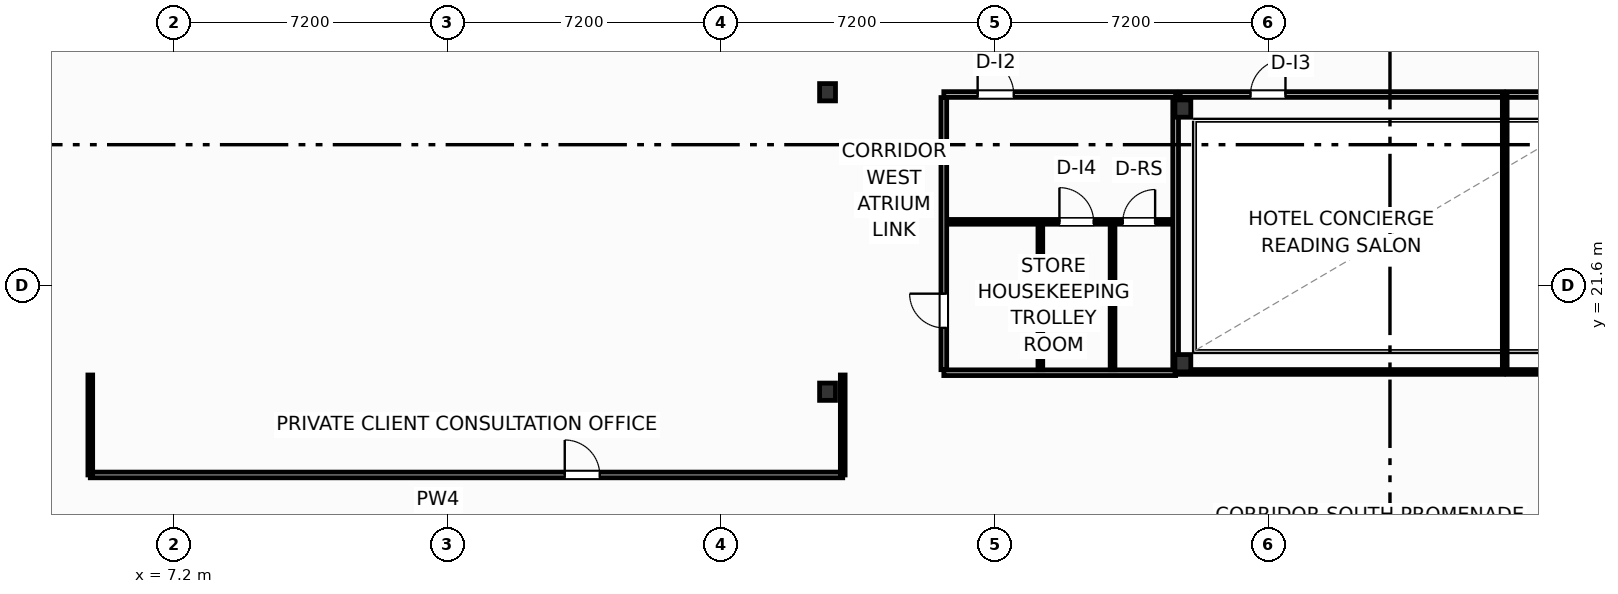
"""IFC4 building model, lengths in metres.
Left out: names, types, materials, properties, quantities, classifications, styles, units other than length and angle.
Written with IfcOpenShell. Run it as: python <this file> out.ifc"""

import sys

from ifc_helpers import new_model, si_unit, direction, frame, frame_2d, origin, origin_2d, place, context, subcontext, project, spatial, rectangle, i_section, extrude, element, fill, save


model = new_model("IFC4")
c1 = context("Model", 3, precision=1e-05, world=origin(), true_north=direction((0.0, 1.0)))
c2 = subcontext(c1, "Body", "Model", "MODEL_VIEW")
j1 = project(units=[si_unit("LENGTHUNIT", "METRE"), si_unit("PLANEANGLEUNIT", "RADIAN")], contexts=[c1])
p1 = place(None, origin())
s1 = spatial("IfcSite", under=j1, at=p1, CompositionType="ELEMENT")
p2 = place(p1, origin())
s2 = spatial("IfcBuilding", under=s1, at=p2, CompositionType="ELEMENT")
p3 = place(p2, frame((0.0, 0.0, 158.7)))
s3 = spatial("IfcBuildingStorey", under=s2, at=p3, CompositionType="ELEMENT", Elevation=158.7)
for number, where, z_axis, x_axis in (
    (1, (33.75, 19.55, 0.0), (0.0, 0.0, 1.0), (1.0, 0.0, 0.0)),
    (2, (33.75, 26.25, 0.0), (0.0, 0.0, 1.0), (1.0, 0.0, 0.0)),
    (3, (24.4, 18.8, 0.0), (0.0, 0.0, 1.0), (1.0, 0.0, 0.0)),
    (4, (24.4, 26.68, 0.0), (0.0, 0.0, 1.0), (1.0, 0.0, 0.0)),
):
    element("IfcColumn", number, at=place(p3, frame(where, z_axis=z_axis, x_axis=x_axis)), inside=s3, PredefinedType="COLUMN", context=c2, shape_type="SweptSolid", body=[
        extrude(i_section(OverallWidth=0.418, OverallDepth=0.455, WebThickness=0.042, FlangeThickness=0.068, FilletRadius=0.025, at=origin_2d()), origin(), (0.0, 0.0, 1.0), 3.7),
    ])
p4 = place(p3, frame((33.68, 26.62, 0.0), z_axis=(0.0, 0.0, 1.0), x_axis=(1.0, 0.0, 0.0)))
e5 = element("IfcWall", 5, at=p4, inside=s3, PredefinedType="PARTITIONING", context=c2, shape_type="SweptSolid", body=[
    extrude(rectangle(XDim=8.5, YDim=0.15, at=frame_2d((4.25, 0.0))), origin(), (0.0, 0.0, 1.0), 3.38),
])
p5 = place(p4, frame((1.85, 0.0, 0.0)))
e6 = element("IfcOpeningElement", 6, at=p5, cuts=e5, PredefinedType="OPENING", context=c2, shape_type="SweptSolid", body=[
    extrude(rectangle(XDim=0.92, YDim=2.05, at=frame_2d((0.46, 1.025))), frame((0.0, 0.085, 0.0), z_axis=(0.0, -1.0, 0.0), x_axis=(1.0, 0.0, 0.0)), (0.0, 0.0, 1.0), 0.17),
])
p6 = place(p3, frame((33.68, 19.32, 0.0), z_axis=(0.0, 0.0, 1.0), x_axis=(1.0, 0.0, 0.0)))
e7 = element("IfcWall", 7, at=p6, inside=s3, PredefinedType="PARTITIONING", context=c2, shape_type="SweptSolid", body=[
    extrude(rectangle(XDim=8.5, YDim=0.125, at=frame_2d((4.25, 0.0))), origin(), (0.0, 0.0, 1.0), 2.754),
])
p7 = place(p3, frame((42.22, 19.32, 0.0), z_axis=(0.0, 0.0, 1.0), x_axis=(0.0, 1.0, 0.0)))
e8 = element("IfcWall", 8, at=p7, inside=s3, PredefinedType="PARTITIONING", context=c2, shape_type="SweptSolid", body=[
    extrude(rectangle(XDim=7.3, YDim=0.125, at=frame_2d((3.65, 0.0))), origin(), (0.0, 0.0, 1.0), 3.38),
])
p8 = place(p3, frame((42.28, 26.62, 0.0), z_axis=(0.0, 0.0, 1.0), x_axis=(1.0, 0.0, 0.0)))
e9 = element("IfcWall", 9, at=p8, inside=s3, PredefinedType="PARTITIONING", context=c2, shape_type="SweptSolid", body=[
    extrude(rectangle(XDim=8.06, YDim=0.15, at=frame_2d((4.03, 0.0))), origin(), (0.0, 0.0, 1.0), 3.38),
])
p9 = place(p8, frame((0.954, 0.0, 0.0)))
e10 = element("IfcOpeningElement", 10, at=p9, cuts=e9, PredefinedType="OPENING", context=c2, shape_type="SweptSolid", body=[
    extrude(rectangle(XDim=0.92, YDim=2.05, at=frame_2d((0.46, 1.025))), frame((0.0, 0.085, 0.0), z_axis=(0.0, -1.0, 0.0), x_axis=(1.0, 0.0, 0.0)), (0.0, 0.0, 1.0), 0.17),
])
p10 = place(p3, frame((42.28, 19.32, 0.0), z_axis=(0.0, 0.0, 1.0), x_axis=(1.0, 0.0, 0.0)))
e11 = element("IfcWall", 11, at=p10, inside=s3, PredefinedType="PARTITIONING", context=c2, shape_type="SweptSolid", body=[
    extrude(rectangle(XDim=8.06, YDim=0.125, at=frame_2d((4.03, 0.0))), origin(), (0.0, 0.0, 1.0), 2.592),
])
p11 = place(p3, frame((5.0, 16.61, 0.0), z_axis=(0.0, 0.0, 1.0), x_axis=(1.0, 0.0, 0.0)))
e12 = element("IfcWall", 12, at=p11, inside=s3, PredefinedType="PARTITIONING", context=c2, shape_type="SweptSolid", body=[
    extrude(rectangle(XDim=19.8, YDim=0.15, at=frame_2d((9.9, 0.0))), origin(), (0.0, 0.0, 1.0), 3.38),
])
p12 = place(p11, frame((12.485, 0.0, 0.0)))
e13 = element("IfcOpeningElement", 13, at=p12, cuts=e12, PredefinedType="OPENING", context=c2, shape_type="SweptSolid", body=[
    extrude(rectangle(XDim=0.92, YDim=2.05, at=frame_2d((0.46, 1.025))), frame((0.0, 0.085, 0.0), z_axis=(0.0, -1.0, 0.0), x_axis=(1.0, 0.0, 0.0)), (0.0, 0.0, 1.0), 0.17),
])
p13 = place(p3, frame((5.0, 16.61, 0.0), z_axis=(0.0, 0.0, 1.0), x_axis=(0.0, 1.0, 0.0)))
e14 = element("IfcWall", 14, at=p13, inside=s3, PredefinedType="PARTITIONING", context=c2, shape_type="SweptSolid", body=[
    extrude(rectangle(XDim=2.63, YDim=0.125, at=frame_2d((1.315, 0.0))), origin(), (0.0, 0.0, 1.0), 3.38),
])
p14 = place(p3, frame((24.8, 16.61, 0.0), z_axis=(0.0, 0.0, 1.0), x_axis=(0.0, 1.0, 0.0)))
e15 = element("IfcWall", 15, at=p14, inside=s3, PredefinedType="PARTITIONING", context=c2, shape_type="SweptSolid", body=[
    extrude(rectangle(XDim=2.63, YDim=0.125, at=frame_2d((1.315, 0.0))), origin(), (0.0, 0.0, 1.0), 1.165),
])
p15 = place(p3, frame((27.46, 26.62, 0.0), z_axis=(0.0, 0.0, 1.0), x_axis=(1.0, 0.0, 0.0)))
e16 = element("IfcWall", 16, at=p15, inside=s3, PredefinedType="PARTITIONING", context=c2, shape_type="SweptSolid", body=[
    extrude(rectangle(XDim=6.1, YDim=0.15, at=frame_2d((3.05, 0.0))), origin(), (0.0, 0.0, 1.0), 2.592),
])
p16 = place(p15, frame((0.89, 0.0, 0.0)))
e17 = element("IfcOpeningElement", 17, at=p16, cuts=e16, PredefinedType="OPENING", context=c2, shape_type="SweptSolid", body=[
    extrude(rectangle(XDim=0.95, YDim=2.05, at=frame_2d((0.475, 1.025))), frame((0.0, 0.085, 0.0), z_axis=(0.0, -1.0, 0.0), x_axis=(1.0, 0.0, 0.0)), (0.0, 0.0, 1.0), 0.17),
])
p17 = place(p3, frame((27.46, 19.3, 0.0), z_axis=(0.0, 0.0, 1.0), x_axis=(1.0, 0.0, 0.0)))
e18 = element("IfcWall", 18, at=p17, inside=s3, PredefinedType="PARTITIONING", context=c2, shape_type="SweptSolid", body=[
    extrude(rectangle(XDim=6.1, YDim=0.15, at=frame_2d((3.05, 0.0))), origin(), (0.0, 0.0, 1.0), 2.592),
])
p18 = place(p3, frame((27.52, 23.27, 0.0), z_axis=(0.0, 0.0, 1.0), x_axis=(1.0, 0.0, 0.0)))
e19 = element("IfcWall", 19, at=p18, inside=s3, PredefinedType="PARTITIONING", context=c2, shape_type="SweptSolid", body=[
    extrude(rectangle(XDim=6.0, YDim=0.125, at=frame_2d((3.0, 0.0))), origin(), (0.0, 0.0, 1.0), 3.38),
])
p19 = place(p18, frame((2.982, 0.0, 0.0)))
e20 = element("IfcOpeningElement", 20, at=p19, cuts=e19, PredefinedType="OPENING", context=c2, shape_type="SweptSolid", body=[
    extrude(rectangle(XDim=0.9, YDim=2.05, at=frame_2d((0.45, 1.025))), frame((0.0, 0.073, 0.0), z_axis=(0.0, -1.0, 0.0), x_axis=(1.0, 0.0, 0.0)), (0.0, 0.0, 1.0), 0.145),
])
p20 = place(p18, frame((4.65, 0.0, 0.0)))
e21 = element("IfcOpeningElement", 21, at=p20, cuts=e19, PredefinedType="OPENING", context=c2, shape_type="SweptSolid", body=[
    extrude(rectangle(XDim=0.85, YDim=2.05, at=frame_2d((0.425, 1.025))), frame((0.0, 0.073, 0.0), z_axis=(0.0, -1.0, 0.0), x_axis=(1.0, 0.0, 0.0)), (0.0, 0.0, 1.0), 0.145),
])
for number, where, z_axis, x_axis in (
    (22, (30.0, 19.38, 0.0), (0.0, 0.0, 1.0), (0.0, 1.0, 0.0)),
    (23, (31.9, 19.38, 0.0), (0.0, 0.0, 1.0), (0.0, 1.0, 0.0)),
):
    element("IfcWall", number, at=place(p3, frame(where, z_axis=z_axis, x_axis=x_axis)), inside=s3, PredefinedType="PARTITIONING", context=c2, shape_type="SweptSolid", body=[
        extrude(rectangle(XDim=3.82, YDim=0.125, at=frame_2d((1.91, 0.0))), origin(), (0.0, 0.0, 1.0), 3.38),
    ])
p21 = place(p3, frame((27.46, 19.38, 0.0), z_axis=(0.0, 0.0, 1.0), x_axis=(0.0, 1.0, 0.0)))
e24 = element("IfcWall", 24, at=p21, inside=s3, PredefinedType="PARTITIONING", context=c2, shape_type="SweptSolid", body=[
    extrude(rectangle(XDim=7.16, YDim=0.15, at=frame_2d((3.58, 0.0))), origin(), (0.0, 0.0, 1.0), 3.38),
])
p22 = place(p21, frame((1.1, 0.0, 0.0)))
e25 = element("IfcOpeningElement", 25, at=p22, cuts=e24, PredefinedType="OPENING", context=c2, shape_type="SweptSolid", body=[
    extrude(rectangle(XDim=0.9, YDim=2.05, at=frame_2d((0.45, 1.025))), frame((0.0, 0.085, 0.0), z_axis=(0.0, -1.0, 0.0), x_axis=(1.0, 0.0, 0.0)), (0.0, 0.0, 1.0), 0.17),
])
p23 = place(p3, frame((33.56, 19.38, 0.0), z_axis=(0.0, 0.0, 1.0), x_axis=(0.0, 1.0, 0.0)))
e26 = element("IfcWall", 26, at=p23, inside=s3, PredefinedType="PARTITIONING", context=c2, shape_type="SweptSolid", body=[
    extrude(rectangle(XDim=7.16, YDim=0.15, at=frame_2d((3.58, 0.0))), origin(), (0.0, 0.0, 1.0), 2.754),
])
p24 = place(p5, origin())
e27 = element("IfcDoor", 27, at=p24, inside=s3, OperationType="SINGLE_SWING_RIGHT", PredefinedType="DOOR", context=c2, shape_type="SweptSolid", body=[
    extrude(rectangle(XDim=0.92, YDim=2.05, at=frame_2d((0.46, 1.025))), frame((0.0, 0.025, 0.0), z_axis=(0.0, -1.0, 0.0), x_axis=(1.0, 0.0, 0.0)), (0.0, 0.0, 1.0), 0.05),
])
fill(e6, e27)
p25 = place(p12, origin())
e28 = element("IfcDoor", 28, at=p25, inside=s3, OperationType="SINGLE_SWING_LEFT", PredefinedType="DOOR", context=c2, shape_type="SweptSolid", body=[
    extrude(rectangle(XDim=0.92, YDim=2.05, at=frame_2d((0.46, 1.025))), frame((0.0, 0.025, 0.0), z_axis=(0.0, -1.0, 0.0), x_axis=(1.0, 0.0, 0.0)), (0.0, 0.0, 1.0), 0.05),
])
fill(e13, e28)
p26 = place(p16, origin())
e29 = element("IfcDoor", 29, at=p26, inside=s3, OperationType="SINGLE_SWING_LEFT", PredefinedType="DOOR", context=c2, shape_type="SweptSolid", body=[
    extrude(rectangle(XDim=0.95, YDim=2.05, at=frame_2d((0.475, 1.025))), frame((0.0, 0.025, 0.0), z_axis=(0.0, -1.0, 0.0), x_axis=(1.0, 0.0, 0.0)), (0.0, 0.0, 1.0), 0.05),
])
fill(e17, e29)
p27 = place(p19, origin())
e30 = element("IfcDoor", 30, at=p27, inside=s3, OperationType="SINGLE_SWING_LEFT", PredefinedType="DOOR", context=c2, shape_type="SweptSolid", body=[
    extrude(rectangle(XDim=0.9, YDim=2.05, at=frame_2d((0.45, 1.025))), frame((0.0, 0.025, 0.0), z_axis=(0.0, -1.0, 0.0), x_axis=(1.0, 0.0, 0.0)), (0.0, 0.0, 1.0), 0.05),
])
fill(e20, e30)
p28 = place(p20, origin())
e31 = element("IfcDoor", 31, at=p28, inside=s3, OperationType="SINGLE_SWING_RIGHT", PredefinedType="DOOR", context=c2, shape_type="SweptSolid", body=[
    extrude(rectangle(XDim=0.85, YDim=2.05, at=frame_2d((0.425, 1.025))), frame((0.0, 0.025, 0.0), z_axis=(0.0, -1.0, 0.0), x_axis=(1.0, 0.0, 0.0)), (0.0, 0.0, 1.0), 0.05),
])
fill(e21, e31)
p29 = place(p22, origin())
e32 = element("IfcDoor", 32, at=p29, inside=s3, OperationType="SINGLE_SWING_RIGHT", PredefinedType="DOOR", context=c2, shape_type="SweptSolid", body=[
    extrude(rectangle(XDim=0.9, YDim=2.05, at=frame_2d((0.45, 1.025))), frame((0.0, 0.025, 0.0), z_axis=(0.0, -1.0, 0.0), x_axis=(1.0, 0.0, 0.0)), (0.0, 0.0, 1.0), 0.05),
])
fill(e25, e32)
save(model, sys.argv[1])
